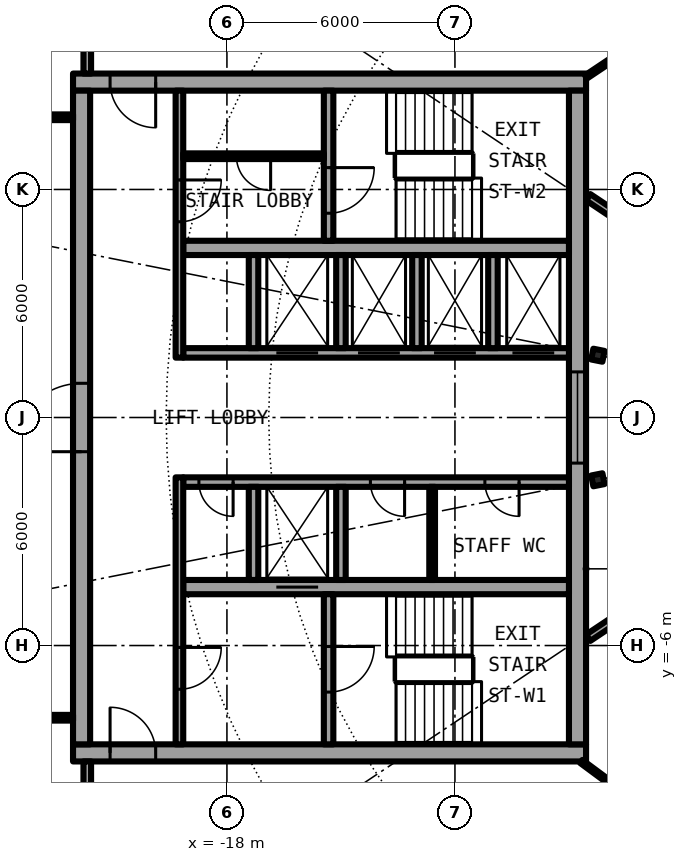
"""IFC4 building model, lengths in metres.
Left out: names, types, materials, properties, quantities, classifications, styles, units other than length and angle.
Written with IfcOpenShell. Run it as: python <this file> out.ifc"""

import sys

from ifc_helpers import new_model, si_unit, direction, frame, frame_2d, origin, origin_2d, place, context, subcontext, project, spatial, rectangle, i_section, extrude, element, fill, save


model = new_model("IFC4")
c1 = context("Model", 3, precision=1e-05, world=origin(), true_north=direction((0.0, 1.0)))
c2 = subcontext(c1, "Body", "Model", "MODEL_VIEW")
j1 = project(units=[si_unit("LENGTHUNIT", "METRE"), si_unit("PLANEANGLEUNIT", "RADIAN")], contexts=[c1])
p1 = place(None, origin())
s1 = spatial("IfcSite", under=j1, at=p1, CompositionType="ELEMENT")
p2 = place(p1, origin())
s2 = spatial("IfcBuilding", under=s1, at=p2, CompositionType="ELEMENT")
p3 = place(p2, frame((0.0, 0.0, 218.8)))
s3 = spatial("IfcBuildingStorey", under=s2, at=p3, CompositionType="ELEMENT", Elevation=218.8)
for number, where, z_axis, x_axis in (
    (1, (-8.239, 1.639, 0.0), (0.0, 0.0, 1.0), (-0.981, 0.195, 0.0)),
    (2, (-8.239, -1.639, 0.0), (0.0, 0.0, 1.0), (-0.981, -0.195, 0.0)),
):
    element("IfcColumn", number, at=place(p3, frame(where, z_axis=z_axis, x_axis=x_axis)), inside=s3, PredefinedType="COLUMN", context=c2, shape_type="SweptSolid", body=[
        extrude(i_section(OverallWidth=0.3, OverallDepth=0.29, WebThickness=0.009, FlangeThickness=0.014, FilletRadius=0.027, at=origin_2d()), origin(), (0.0, 0.0, 1.0), 3.05),
    ])
p4 = place(p3, frame((-22.05, -8.825, 0.0), z_axis=(0.0, 0.0, 1.0), x_axis=(1.0, 0.0, 0.0)))
e3 = element("IfcWall", 3, at=p4, inside=s3, PredefinedType="SHEAR", context=c2, shape_type="SweptSolid", body=[
    extrude(rectangle(XDim=13.5, YDim=0.45, at=frame_2d((6.75, 0.0))), origin(), (0.0, 0.0, 1.0), 3.05),
])
p5 = place(p4, frame((0.975, 0.0, 0.0)))
e4 = element("IfcOpeningElement", 4, at=p5, cuts=e3, PredefinedType="OPENING", context=c2, shape_type="SweptSolid", body=[
    extrude(rectangle(XDim=1.2, YDim=2.3, at=frame_2d((0.6, 1.15))), frame((0.0, 0.235, 0.0), z_axis=(0.0, -1.0, 0.0), x_axis=(1.0, 0.0, 0.0)), (0.0, 0.0, 1.0), 0.47),
])
p6 = place(p3, frame((-8.55, 8.825, 0.0), z_axis=(0.0, 0.0, 1.0), x_axis=(-1.0, 0.0, 0.0)))
e5 = element("IfcWall", 5, at=p6, inside=s3, PredefinedType="SHEAR", context=c2, shape_type="SweptSolid", body=[
    extrude(rectangle(XDim=13.5, YDim=0.45, at=frame_2d((6.75, 0.0))), origin(), (0.0, 0.0, 1.0), 3.05),
])
p7 = place(p6, frame((11.325, 0.0, 0.0)))
e6 = element("IfcOpeningElement", 6, at=p7, cuts=e5, PredefinedType="OPENING", context=c2, shape_type="SweptSolid", body=[
    extrude(rectangle(XDim=1.2, YDim=2.3, at=frame_2d((0.6, 1.15))), frame((0.0, 0.235, 0.0), z_axis=(0.0, -1.0, 0.0), x_axis=(1.0, 0.0, 0.0)), (0.0, 0.0, 1.0), 0.47),
])
p8 = place(p3, frame((-21.825, -8.6, 0.0), z_axis=(0.0, 0.0, 1.0), x_axis=(0.0, 1.0, 0.0)))
e7 = element("IfcWall", 7, at=p8, inside=s3, PredefinedType="SHEAR", context=c2, shape_type="SweptSolid", body=[
    extrude(rectangle(XDim=17.2, YDim=0.45, at=frame_2d((8.6, 0.0))), origin(), (0.0, 0.0, 1.0), 3.05),
])
p9 = place(p8, frame((7.7, 0.0, 0.0)))
e8 = element("IfcOpeningElement", 8, at=p9, cuts=e7, PredefinedType="OPENING", context=c2, shape_type="SweptSolid", body=[
    extrude(rectangle(XDim=1.8, YDim=2.3, at=frame_2d((0.9, 1.15))), frame((0.0, 0.235, 0.0), z_axis=(0.0, -1.0, 0.0), x_axis=(1.0, 0.0, 0.0)), (0.0, 0.0, 1.0), 0.47),
])
p10 = place(p3, frame((-8.775, 8.6, 0.0), z_axis=(0.0, 0.0, 1.0), x_axis=(0.0, -1.0, 0.0)))
e9 = element("IfcWall", 9, at=p10, inside=s3, PredefinedType="SHEAR", context=c2, shape_type="SweptSolid", body=[
    extrude(rectangle(XDim=17.2, YDim=0.45, at=frame_2d((8.6, 0.0))), origin(), (0.0, 0.0, 1.0), 3.05),
])
p11 = place(p10, frame((7.4, 0.0, 0.1)))
e10 = element("IfcOpeningElement", 10, at=p11, cuts=e9, PredefinedType="OPENING", context=c2, shape_type="SweptSolid", body=[
    extrude(rectangle(XDim=2.4, YDim=2.2, at=frame_2d((1.2, 1.1))), frame((0.0, 0.235, 0.0), z_axis=(0.0, -1.0, 0.0), x_axis=(1.0, 0.0, 0.0)), (0.0, 0.0, 1.0), 0.47),
])
p12 = place(p3, frame((-9.0, -1.7, 0.0), z_axis=(0.0, 0.0, 1.0), x_axis=(-1.0, 0.0, 0.0)))
e11 = element("IfcWall", 11, at=p12, inside=s3, PredefinedType="SHEAR", context=c2, shape_type="SweptSolid", body=[
    extrude(rectangle(XDim=10.15, YDim=0.25, at=frame_2d((5.075, 0.0))), origin(), (0.0, 0.0, 1.0), 3.05),
])
p13 = place(p12, frame((1.312, 0.0, 0.0)))
e12 = element("IfcOpeningElement", 12, at=p13, cuts=e11, PredefinedType="OPENING", context=c2, shape_type="SweptSolid", body=[
    extrude(rectangle(XDim=0.9, YDim=2.3, at=frame_2d((0.45, 1.15))), frame((0.0, 0.135, 0.0), z_axis=(0.0, -1.0, 0.0), x_axis=(1.0, 0.0, 0.0)), (0.0, 0.0, 1.0), 0.27),
])
p14 = place(p12, frame((4.325, 0.0, 0.0)))
e13 = element("IfcOpeningElement", 13, at=p14, cuts=e11, PredefinedType="OPENING", context=c2, shape_type="SweptSolid", body=[
    extrude(rectangle(XDim=0.9, YDim=2.3, at=frame_2d((0.45, 1.15))), frame((0.0, 0.135, 0.0), z_axis=(0.0, -1.0, 0.0), x_axis=(1.0, 0.0, 0.0)), (0.0, 0.0, 1.0), 0.27),
])
p15 = place(p12, frame((8.837, 0.0, 0.0)))
e14 = element("IfcOpeningElement", 14, at=p15, cuts=e11, PredefinedType="OPENING", context=c2, shape_type="SweptSolid", body=[
    extrude(rectangle(XDim=0.9, YDim=2.3, at=frame_2d((0.45, 1.15))), frame((0.0, 0.135, 0.0), z_axis=(0.0, -1.0, 0.0), x_axis=(1.0, 0.0, 0.0)), (0.0, 0.0, 1.0), 0.27),
])
p16 = place(p3, frame((-9.0, -4.462, 0.0), z_axis=(0.0, 0.0, 1.0), x_axis=(-1.0, 0.0, 0.0)))
e15 = element("IfcWall", 15, at=p16, inside=s3, PredefinedType="SHEAR", context=c2, shape_type="SweptSolid", body=[
    extrude(rectangle(XDim=10.15, YDim=0.375, at=frame_2d((5.075, 0.0))), origin(), (0.0, 0.0, 1.0), 3.05),
])
p17 = place(p16, frame((6.6, 0.0, 0.0)))
e16 = element("IfcOpeningElement", 16, at=p17, cuts=e15, PredefinedType="OPENING", context=c2, shape_type="SweptSolid", body=[
    extrude(rectangle(XDim=1.1, YDim=2.3, at=frame_2d((0.55, 1.15))), frame((0.0, 0.198, 0.0), z_axis=(0.0, -1.0, 0.0), x_axis=(1.0, 0.0, 0.0)), (0.0, 0.0, 1.0), 0.395),
])
p18 = place(p3, frame((-15.325, -4.65, 0.0), z_axis=(0.0, 0.0, 1.0), x_axis=(0.0, -1.0, 0.0)))
e17 = element("IfcWall", 17, at=p18, inside=s3, PredefinedType="SHEAR", context=c2, shape_type="SweptSolid", body=[
    extrude(rectangle(XDim=3.95, YDim=0.25, at=frame_2d((1.975, 0.0))), origin(), (0.0, 0.0, 1.0), 3.05),
])
p19 = place(p18, frame((1.375, 0.0, 0.0)))
e18 = element("IfcOpeningElement", 18, at=p19, cuts=e17, PredefinedType="OPENING", context=c2, shape_type="SweptSolid", body=[
    extrude(rectangle(XDim=1.2, YDim=2.3, at=frame_2d((0.6, 1.15))), frame((0.0, 0.135, 0.0), z_axis=(0.0, -1.0, 0.0), x_axis=(1.0, 0.0, 0.0)), (0.0, 0.0, 1.0), 0.27),
])
for number, where, z_axis, x_axis in (
    (19, (-15.0, -1.825, 0.0), (0.0, 0.0, 1.0), (0.0, -1.0, 0.0)),
    (20, (-17.3, -1.825, 0.0), (0.0, 0.0, 1.0), (0.0, -1.0, 0.0)),
):
    element("IfcWall", number, at=place(p3, frame(where, z_axis=z_axis, x_axis=x_axis)), inside=s3, PredefinedType="SOLIDWALL", context=c2, shape_type="SweptSolid", body=[
        extrude(rectangle(XDim=2.45, YDim=0.25, at=frame_2d((1.225, 0.0))), origin(), (0.0, 0.0, 1.0), 2.65),
    ])
p20 = place(p3, frame((-19.25, -1.575, 0.0), z_axis=(0.0, 0.0, 1.0), x_axis=(0.0, -1.0, 0.0)))
e21 = element("IfcWall", 21, at=p20, inside=s3, PredefinedType="SOLIDWALL", context=c2, shape_type="SweptSolid", body=[
    extrude(rectangle(XDim=7.025, YDim=0.2, at=frame_2d((3.513, 0.0))), origin(), (0.0, 0.0, 1.0), 2.65),
])
p21 = place(p20, frame((4.475, 0.0, 0.0)))
e22 = element("IfcOpeningElement", 22, at=p21, cuts=e21, PredefinedType="OPENING", context=c2, shape_type="SweptSolid", body=[
    extrude(rectangle(XDim=1.1, YDim=2.3, at=frame_2d((0.55, 1.15))), frame((0.0, 0.11, 0.0), z_axis=(0.0, -1.0, 0.0), x_axis=(1.0, 0.0, 0.0)), (0.0, 0.0, 1.0), 0.22),
])
p22 = place(p3, frame((-9.0, 1.7, 0.0), z_axis=(0.0, 0.0, 1.0), x_axis=(-1.0, 0.0, 0.0)))
e23 = element("IfcWall", 23, at=p22, inside=s3, PredefinedType="SHEAR", context=c2, shape_type="SweptSolid", body=[
    extrude(rectangle(XDim=10.15, YDim=0.25, at=frame_2d((5.075, 0.0))), origin(), (0.0, 0.0, 1.0), 3.05),
])
p23 = place(p22, frame((0.387, 0.0, 0.0)))
e24 = element("IfcOpeningElement", 24, at=p23, cuts=e23, PredefinedType="OPENING", context=c2, shape_type="SweptSolid", body=[
    extrude(rectangle(XDim=1.1, YDim=2.3, at=frame_2d((0.55, 1.15))), frame((0.0, 0.135, 0.0), z_axis=(0.0, -1.0, 0.0), x_axis=(1.0, 0.0, 0.0)), (0.0, 0.0, 1.0), 0.27),
])
p24 = place(p22, frame((2.45, 0.0, 0.0)))
e25 = element("IfcOpeningElement", 25, at=p24, cuts=e23, PredefinedType="OPENING", context=c2, shape_type="SweptSolid", body=[
    extrude(rectangle(XDim=1.1, YDim=2.3, at=frame_2d((0.55, 1.15))), frame((0.0, 0.135, 0.0), z_axis=(0.0, -1.0, 0.0), x_axis=(1.0, 0.0, 0.0)), (0.0, 0.0, 1.0), 0.27),
])
p25 = place(p22, frame((4.45, 0.0, 0.0)))
e26 = element("IfcOpeningElement", 26, at=p25, cuts=e23, PredefinedType="OPENING", context=c2, shape_type="SweptSolid", body=[
    extrude(rectangle(XDim=1.1, YDim=2.3, at=frame_2d((0.55, 1.15))), frame((0.0, 0.135, 0.0), z_axis=(0.0, -1.0, 0.0), x_axis=(1.0, 0.0, 0.0)), (0.0, 0.0, 1.0), 0.27),
])
p26 = place(p22, frame((6.6, 0.0, 0.0)))
e27 = element("IfcOpeningElement", 27, at=p26, cuts=e23, PredefinedType="OPENING", context=c2, shape_type="SweptSolid", body=[
    extrude(rectangle(XDim=1.1, YDim=2.3, at=frame_2d((0.55, 1.15))), frame((0.0, 0.135, 0.0), z_axis=(0.0, -1.0, 0.0), x_axis=(1.0, 0.0, 0.0)), (0.0, 0.0, 1.0), 0.27),
])
p27 = place(p3, frame((-9.0, 4.462, 0.0), z_axis=(0.0, 0.0, 1.0), x_axis=(-1.0, 0.0, 0.0)))
e28 = element("IfcWall", 28, at=p27, inside=s3, PredefinedType="SHEAR", context=c2, shape_type="SweptSolid", body=[
    extrude(rectangle(XDim=10.15, YDim=0.375, at=frame_2d((5.075, 0.0))), origin(), (0.0, 0.0, 1.0), 3.05),
])
p28 = place(p3, frame((-15.325, 8.6, 0.0), z_axis=(0.0, 0.0, 1.0), x_axis=(0.0, -1.0, 0.0)))
e29 = element("IfcWall", 29, at=p28, inside=s3, PredefinedType="SHEAR", context=c2, shape_type="SweptSolid", body=[
    extrude(rectangle(XDim=3.95, YDim=0.25, at=frame_2d((1.975, 0.0))), origin(), (0.0, 0.0, 1.0), 3.05),
])
p29 = place(p28, frame((2.025, 0.0, 0.0)))
e30 = element("IfcOpeningElement", 30, at=p29, cuts=e29, PredefinedType="OPENING", context=c2, shape_type="SweptSolid", body=[
    extrude(rectangle(XDim=1.2, YDim=2.3, at=frame_2d((0.6, 1.15))), frame((0.0, 0.135, 0.0), z_axis=(0.0, -1.0, 0.0), x_axis=(1.0, 0.0, 0.0)), (0.0, 0.0, 1.0), 0.27),
])
for number, where, z_axis, x_axis in (
    (31, (-15.0, 1.825, 0.0), (0.0, 0.0, 1.0), (0.0, 1.0, 0.0)),
    (32, (-17.3, 1.825, 0.0), (0.0, 0.0, 1.0), (0.0, 1.0, 0.0)),
):
    element("IfcWall", number, at=place(p3, frame(where, z_axis=z_axis, x_axis=x_axis)), inside=s3, PredefinedType="SOLIDWALL", context=c2, shape_type="SweptSolid", body=[
        extrude(rectangle(XDim=2.45, YDim=0.25, at=frame_2d((1.225, 0.0))), origin(), (0.0, 0.0, 1.0), 2.65),
    ])
p30 = place(p3, frame((-19.25, 8.6, 0.0), z_axis=(0.0, 0.0, 1.0), x_axis=(0.0, -1.0, 0.0)))
e33 = element("IfcWall", 33, at=p30, inside=s3, PredefinedType="SOLIDWALL", context=c2, shape_type="SweptSolid", body=[
    extrude(rectangle(XDim=7.025, YDim=0.2, at=frame_2d((3.513, 0.0))), origin(), (0.0, 0.0, 1.0), 2.65),
])
p31 = place(p30, frame((2.35, 0.0, 0.0)))
e34 = element("IfcOpeningElement", 34, at=p31, cuts=e33, PredefinedType="OPENING", context=c2, shape_type="SweptSolid", body=[
    extrude(rectangle(XDim=1.1, YDim=2.3, at=frame_2d((0.55, 1.15))), frame((0.0, 0.11, 0.0), z_axis=(0.0, -1.0, 0.0), x_axis=(1.0, 0.0, 0.0)), (0.0, 0.0, 1.0), 0.22),
])
for number, where, z_axis, x_axis in (
    (35, (-11.0, 1.825, 0.0), (0.0, 0.0, 1.0), (0.0, 1.0, 0.0)),
    (36, (-13.0, 1.825, 0.0), (0.0, 0.0, 1.0), (0.0, 1.0, 0.0)),
):
    element("IfcWall", number, at=place(p3, frame(where, z_axis=z_axis, x_axis=x_axis)), inside=s3, PredefinedType="SOLIDWALL", context=c2, shape_type="SweptSolid", body=[
        extrude(rectangle(XDim=2.45, YDim=0.25, at=frame_2d((1.225, 0.0))), origin(), (0.0, 0.0, 1.0), 2.65),
    ])
p32 = place(p3, frame((-12.6, -1.825, 0.0), z_axis=(0.0, 0.0, 1.0), x_axis=(0.0, -1.0, 0.0)))
e37 = element("IfcWall", 37, at=p32, inside=s3, PredefinedType="PARTITIONING", context=c2, shape_type="SweptSolid", body=[
    extrude(rectangle(XDim=2.45, YDim=0.15, at=frame_2d((1.225, 0.0))), origin(), (0.0, 0.0, 1.0), 2.65),
])
p33 = place(p3, frame((-15.45, 6.875, 0.0), z_axis=(0.0, 0.0, 1.0), x_axis=(-1.0, 0.0, 0.0)))
e38 = element("IfcWall", 38, at=p33, inside=s3, PredefinedType="PARTITIONING", context=c2, shape_type="SweptSolid", body=[
    extrude(rectangle(XDim=3.7, YDim=0.15, at=frame_2d((1.85, 0.0))), origin(), (0.0, 0.0, 1.0), 2.65),
])
p34 = place(p33, frame((1.4, 0.0, 0.0)))
e39 = element("IfcOpeningElement", 39, at=p34, cuts=e38, PredefinedType="OPENING", context=c2, shape_type="SweptSolid", body=[
    extrude(rectangle(XDim=0.9, YDim=2.3, at=frame_2d((0.45, 1.15))), frame((0.0, 0.085, 0.0), z_axis=(0.0, -1.0, 0.0), x_axis=(1.0, 0.0, 0.0)), (0.0, 0.0, 1.0), 0.17),
])
for number, where, z_axis, x_axis in (
    (40, (-22.05, 7.9, 0.0), (0.0, 0.0, 1.0), (-1.0, 0.0, 0.0)),
    (41, (-22.05, -7.9, 0.0), (0.0, 0.0, 1.0), (-1.0, 0.0, 0.0)),
):
    element("IfcWall", number, at=place(p3, frame(where, z_axis=z_axis, x_axis=x_axis)), inside=s3, PredefinedType="PARTITIONING", context=c2, shape_type="SweptSolid", body=[
        extrude(rectangle(XDim=2.89, YDim=0.15, at=frame_2d((1.445, 0.0))), origin(), (0.0, 0.0, 1.0), 2.65),
    ])
p35 = place(p3, frame((-8.676, -9.05, 0.0), z_axis=(0.0, 0.0, 1.0), x_axis=(0.803437844371, -0.595388637977, 0.0)))
e42 = element("IfcWall", 42, at=p35, inside=s3, PredefinedType="PARTITIONING", context=c2, shape_type="SweptSolid", body=[
    extrude(rectangle(XDim=0.942, YDim=0.1, at=frame_2d((0.471, 0.0))), origin(), (0.0, 0.0, 1.0), 2.65),
])
p36 = place(p3, frame((-6.513, -4.472, 0.0), z_axis=(0.0, 0.0, 1.0), x_axis=(-0.831403409976, -0.555669299026, 0.0)))
e43 = element("IfcWall", 43, at=p36, inside=s3, PredefinedType="PARTITIONING", context=c2, shape_type="SweptSolid", body=[
    extrude(rectangle(XDim=2.383, YDim=0.2, at=frame_2d((1.191, 0.0))), origin(), (0.0, 0.0, 1.0), 2.65),
])
p37 = place(p3, frame((-10.612, -12.878, 0.0), z_axis=(0.0, 0.0, 1.0), x_axis=(0.636115614725, 0.771593756262, 0.0)))
e44 = element("IfcWall", 44, at=p37, inside=s3, PredefinedType="PARTITIONING", context=c2, shape_type="SweptSolid", body=[
    extrude(rectangle(XDim=8.967, YDim=0.1, at=frame_2d((4.483, 0.0))), origin(), (0.0, 0.0, 1.0), 2.65),
])
p38 = place(p37, frame((1.667, 0.0, 0.0)))
e45 = element("IfcOpeningElement", 45, at=p38, cuts=e44, PredefinedType="OPENING", context=c2, shape_type="SweptSolid", body=[
    extrude(rectangle(XDim=0.9, YDim=2.3, at=frame_2d((0.45, 1.15))), frame((0.0, 0.06, 0.0), z_axis=(0.0, -1.0, 0.0), x_axis=(1.0, 0.0, 0.0)), (0.0, 0.0, 1.0), 0.12),
])
p39 = place(p37, frame((6.151, 0.0, 0.0)))
e46 = element("IfcOpeningElement", 46, at=p39, cuts=e44, PredefinedType="OPENING", context=c2, shape_type="SweptSolid", body=[
    extrude(rectangle(XDim=0.9, YDim=2.3, at=frame_2d((0.45, 1.15))), frame((0.0, 0.06, 0.0), z_axis=(0.0, -1.0, 0.0), x_axis=(1.0, 0.0, 0.0)), (0.0, 0.0, 1.0), 0.12),
])
p40 = place(p3, frame((-6.513, 4.472, 0.0), z_axis=(0.0, 0.0, 1.0), x_axis=(-0.831403409976, 0.555669299026, 0.0)))
e47 = element("IfcWall", 47, at=p40, inside=s3, PredefinedType="PARTITIONING", context=c2, shape_type="SweptSolid", body=[
    extrude(rectangle(XDim=2.383, YDim=0.2, at=frame_2d((1.191, 0.0))), origin(), (0.0, 0.0, 1.0), 2.65),
])
p41 = place(p3, frame((-8.55, 8.963, 0.0), z_axis=(0.0, 0.0, 1.0), x_axis=(0.83129689803, 0.555828631257, 0.0)))
e48 = element("IfcWall", 48, at=p41, inside=s3, PredefinedType="PARTITIONING", context=c2, shape_type="SweptSolid", body=[
    extrude(rectangle(XDim=3.394, YDim=0.1, at=frame_2d((1.697, 0.0))), origin(), (0.0, 0.0, 1.0), 2.65),
])
for number, where, z_axis, x_axis in (
    (49, (-21.675, -10.825, 0.0), (0.0, 0.0, 1.0), (0.0, 1.0, 0.0)),
    (50, (-21.675, 9.05, 0.0), (0.0, 0.0, 1.0), (0.0, 1.0, 0.0)),
):
    element("IfcWall", number, at=place(p3, frame(where, z_axis=z_axis, x_axis=x_axis)), inside=s3, PredefinedType="PARTITIONING", context=c2, shape_type="SweptSolid", body=[
        extrude(rectangle(XDim=1.775, YDim=0.2, at=frame_2d((0.887, 0.0))), origin(), (0.0, 0.0, 1.0), 2.65),
    ])
p42 = place(p17, origin())
e51 = element("IfcDoor", 51, at=p42, inside=s3, OperationType="DOUBLE_DOOR_SLIDING", PredefinedType="DOOR", context=c2, shape_type="SweptSolid", body=[
    extrude(rectangle(XDim=1.1, YDim=2.3, at=frame_2d((0.55, 1.15))), frame((0.0, 0.025, 0.0), z_axis=(0.0, -1.0, 0.0), x_axis=(1.0, 0.0, 0.0)), (0.0, 0.0, 1.0), 0.05),
])
fill(e16, e51)
p43 = place(p23, origin())
e52 = element("IfcDoor", 52, at=p43, inside=s3, OperationType="DOUBLE_DOOR_SLIDING", PredefinedType="DOOR", context=c2, shape_type="SweptSolid", body=[
    extrude(rectangle(XDim=1.1, YDim=2.3, at=frame_2d((0.55, 1.15))), frame((0.0, 0.025, 0.0), z_axis=(0.0, -1.0, 0.0), x_axis=(1.0, 0.0, 0.0)), (0.0, 0.0, 1.0), 0.05),
])
fill(e24, e52)
p44 = place(p24, origin())
e53 = element("IfcDoor", 53, at=p44, inside=s3, OperationType="DOUBLE_DOOR_SLIDING", PredefinedType="DOOR", context=c2, shape_type="SweptSolid", body=[
    extrude(rectangle(XDim=1.1, YDim=2.3, at=frame_2d((0.55, 1.15))), frame((0.0, 0.025, 0.0), z_axis=(0.0, -1.0, 0.0), x_axis=(1.0, 0.0, 0.0)), (0.0, 0.0, 1.0), 0.05),
])
fill(e25, e53)
p45 = place(p25, origin())
e54 = element("IfcDoor", 54, at=p45, inside=s3, OperationType="DOUBLE_DOOR_SLIDING", PredefinedType="DOOR", context=c2, shape_type="SweptSolid", body=[
    extrude(rectangle(XDim=1.1, YDim=2.3, at=frame_2d((0.55, 1.15))), frame((0.0, 0.025, 0.0), z_axis=(0.0, -1.0, 0.0), x_axis=(1.0, 0.0, 0.0)), (0.0, 0.0, 1.0), 0.05),
])
fill(e26, e54)
p46 = place(p26, origin())
e55 = element("IfcDoor", 55, at=p46, inside=s3, OperationType="DOUBLE_DOOR_SLIDING", PredefinedType="DOOR", context=c2, shape_type="SweptSolid", body=[
    extrude(rectangle(XDim=1.1, YDim=2.3, at=frame_2d((0.55, 1.15))), frame((0.0, 0.025, 0.0), z_axis=(0.0, -1.0, 0.0), x_axis=(1.0, 0.0, 0.0)), (0.0, 0.0, 1.0), 0.05),
])
fill(e27, e55)
p47 = place(p13, origin())
e56 = element("IfcDoor", 56, at=p47, inside=s3, OperationType="SINGLE_SWING_RIGHT", PredefinedType="DOOR", context=c2, shape_type="SweptSolid", body=[
    extrude(rectangle(XDim=0.9, YDim=2.3, at=frame_2d((0.45, 1.15))), frame((0.0, 0.025, 0.0), z_axis=(0.0, -1.0, 0.0), x_axis=(1.0, 0.0, 0.0)), (0.0, 0.0, 1.0), 0.05),
])
fill(e12, e56)
p48 = place(p14, origin())
e57 = element("IfcDoor", 57, at=p48, inside=s3, OperationType="SINGLE_SWING_RIGHT", PredefinedType="DOOR", context=c2, shape_type="SweptSolid", body=[
    extrude(rectangle(XDim=0.9, YDim=2.3, at=frame_2d((0.45, 1.15))), frame((0.0, 0.025, 0.0), z_axis=(0.0, -1.0, 0.0), x_axis=(1.0, 0.0, 0.0)), (0.0, 0.0, 1.0), 0.05),
])
fill(e13, e57)
p49 = place(p15, origin())
e58 = element("IfcDoor", 58, at=p49, inside=s3, OperationType="SINGLE_SWING_LEFT", PredefinedType="DOOR", context=c2, shape_type="SweptSolid", body=[
    extrude(rectangle(XDim=0.9, YDim=2.3, at=frame_2d((0.45, 1.15))), frame((0.0, 0.025, 0.0), z_axis=(0.0, -1.0, 0.0), x_axis=(1.0, 0.0, 0.0)), (0.0, 0.0, 1.0), 0.05),
])
fill(e14, e58)
p50 = place(p34, origin())
e59 = element("IfcDoor", 59, at=p50, inside=s3, OperationType="SINGLE_SWING_LEFT", PredefinedType="DOOR", context=c2, shape_type="SweptSolid", body=[
    extrude(rectangle(XDim=0.9, YDim=2.3, at=frame_2d((0.45, 1.15))), frame((0.0, 0.025, 0.0), z_axis=(0.0, -1.0, 0.0), x_axis=(1.0, 0.0, 0.0)), (0.0, 0.0, 1.0), 0.05),
])
fill(e39, e59)
p51 = place(p19, origin())
e60 = element("IfcDoor", 60, at=p51, inside=s3, OperationType="SINGLE_SWING_LEFT", PredefinedType="DOOR", context=c2, shape_type="SweptSolid", body=[
    extrude(rectangle(XDim=1.2, YDim=2.3, at=frame_2d((0.6, 1.15))), frame((0.0, 0.025, 0.0), z_axis=(0.0, -1.0, 0.0), x_axis=(1.0, 0.0, 0.0)), (0.0, 0.0, 1.0), 0.05),
])
fill(e18, e60)
p52 = place(p29, origin())
e61 = element("IfcDoor", 61, at=p52, inside=s3, OperationType="SINGLE_SWING_LEFT", PredefinedType="DOOR", context=c2, shape_type="SweptSolid", body=[
    extrude(rectangle(XDim=1.2, YDim=2.3, at=frame_2d((0.6, 1.15))), frame((0.0, 0.025, 0.0), z_axis=(0.0, -1.0, 0.0), x_axis=(1.0, 0.0, 0.0)), (0.0, 0.0, 1.0), 0.05),
])
fill(e30, e61)
p53 = place(p21, origin())
e62 = element("IfcDoor", 62, at=p53, inside=s3, OperationType="SINGLE_SWING_LEFT", PredefinedType="DOOR", context=c2, shape_type="SweptSolid", body=[
    extrude(rectangle(XDim=1.1, YDim=2.3, at=frame_2d((0.55, 1.15))), frame((0.0, 0.025, 0.0), z_axis=(0.0, -1.0, 0.0), x_axis=(1.0, 0.0, 0.0)), (0.0, 0.0, 1.0), 0.05),
])
fill(e22, e62)
p54 = place(p31, origin())
e63 = element("IfcDoor", 63, at=p54, inside=s3, OperationType="SINGLE_SWING_RIGHT", PredefinedType="DOOR", context=c2, shape_type="SweptSolid", body=[
    extrude(rectangle(XDim=1.1, YDim=2.3, at=frame_2d((0.55, 1.15))), frame((0.0, 0.025, 0.0), z_axis=(0.0, -1.0, 0.0), x_axis=(1.0, 0.0, 0.0)), (0.0, 0.0, 1.0), 0.05),
])
fill(e34, e63)
p55 = place(p5, origin())
e64 = element("IfcDoor", 64, at=p55, inside=s3, OperationType="SINGLE_SWING_RIGHT", PredefinedType="DOOR", context=c2, shape_type="SweptSolid", body=[
    extrude(rectangle(XDim=1.2, YDim=2.3, at=frame_2d((0.6, 1.15))), frame((0.0, 0.025, 0.0), z_axis=(0.0, -1.0, 0.0), x_axis=(1.0, 0.0, 0.0)), (0.0, 0.0, 1.0), 0.05),
])
fill(e4, e64)
p56 = place(p7, origin())
e65 = element("IfcDoor", 65, at=p56, inside=s3, OperationType="SINGLE_SWING_LEFT", PredefinedType="DOOR", context=c2, shape_type="SweptSolid", body=[
    extrude(rectangle(XDim=1.2, YDim=2.3, at=frame_2d((0.6, 1.15))), frame((0.0, 0.025, 0.0), z_axis=(0.0, -1.0, 0.0), x_axis=(1.0, 0.0, 0.0)), (0.0, 0.0, 1.0), 0.05),
])
fill(e6, e65)
p57 = place(p9, origin())
e66 = element("IfcDoor", 66, at=p57, inside=s3, OperationType="SINGLE_SWING_LEFT", PredefinedType="DOOR", context=c2, shape_type="SweptSolid", body=[
    extrude(rectangle(XDim=1.8, YDim=2.3, at=frame_2d((0.9, 1.15))), frame((0.0, 0.025, 0.0), z_axis=(0.0, -1.0, 0.0), x_axis=(1.0, 0.0, 0.0)), (0.0, 0.0, 1.0), 0.05),
])
fill(e8, e66)
p58 = place(p11, origin())
e67 = element("IfcWindow", 67, at=p58, inside=s3, PartitioningType="SINGLE_PANEL", PredefinedType="WINDOW", context=c2, shape_type="SweptSolid", body=[
    extrude(rectangle(XDim=2.4, YDim=2.2, at=frame_2d((1.2, 1.1))), frame((0.0, 0.03, 0.0), z_axis=(0.0, -1.0, 0.0), x_axis=(1.0, 0.0, 0.0)), (0.0, 0.0, 1.0), 0.06),
])
fill(e10, e67)
save(model, sys.argv[1])
